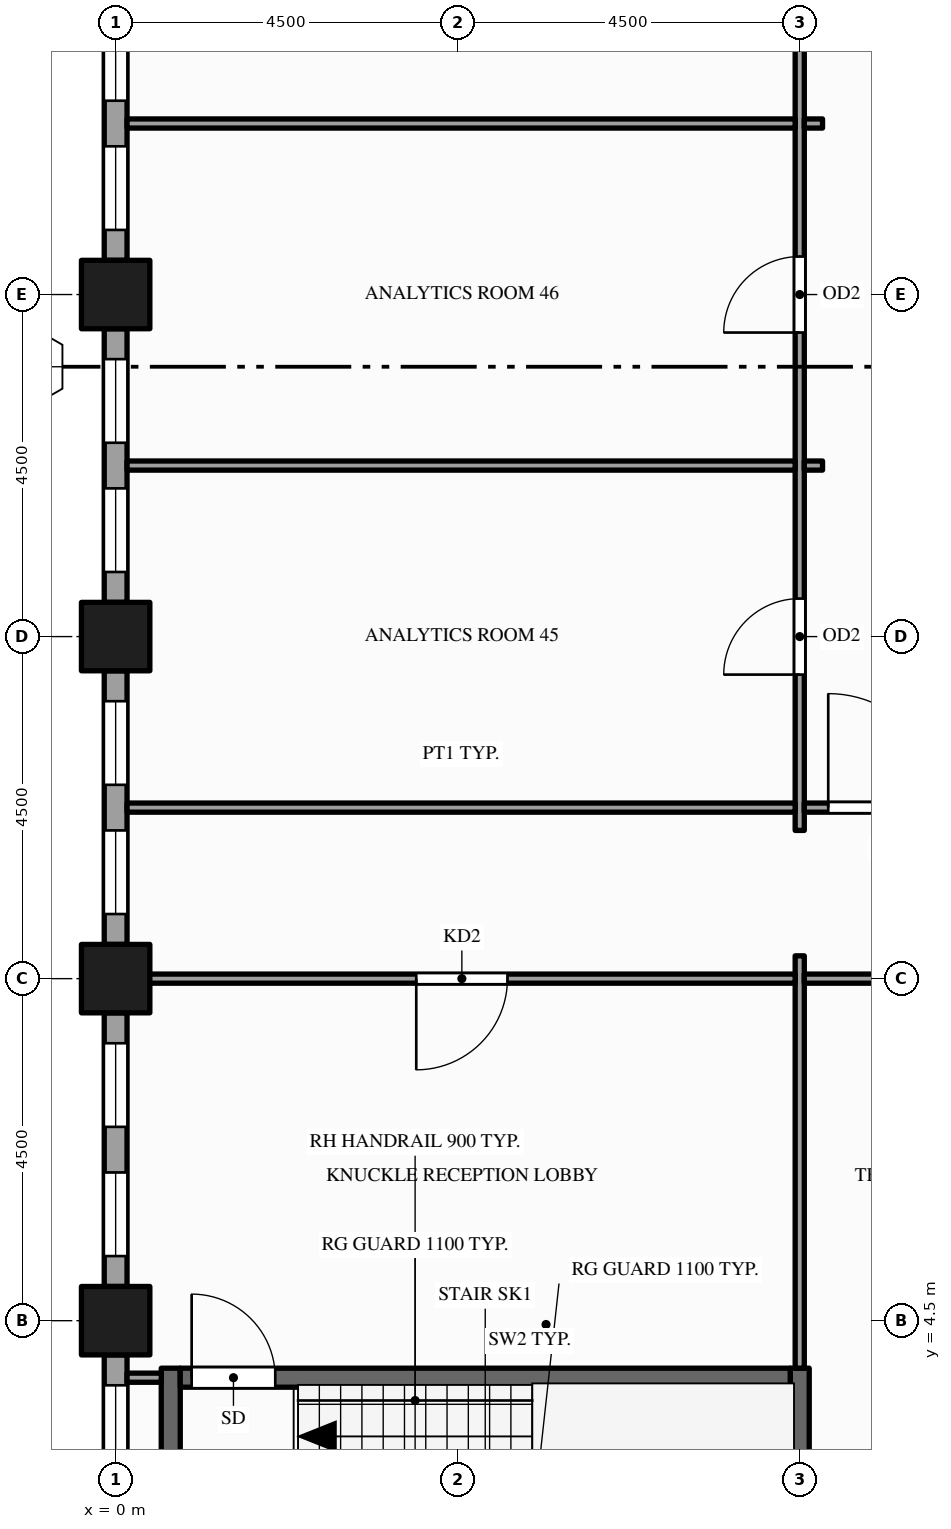
"""IFC4 building model, lengths in metres.
Left out: names, types, materials, properties, quantities, classifications, styles, units other than length and angle.
Written with IfcOpenShell. Run it as: python <this file> out.ifc"""

import sys

from ifc_helpers import new_model, si_unit, direction, frame, frame_2d, origin, origin_2d, place, context, subcontext, project, spatial, rectangle, hollow_rectangle, extrude, element, fill, save


model = new_model("IFC4")
c1 = context("Model", 3, precision=1e-05, world=origin(), true_north=direction((0.0, 1.0)))
c2 = subcontext(c1, "Body", "Model", "MODEL_VIEW")
j1 = project(units=[si_unit("LENGTHUNIT", "METRE"), si_unit("PLANEANGLEUNIT", "RADIAN")], contexts=[c1])
p1 = place(None, origin())
s1 = spatial("IfcSite", under=j1, at=p1, CompositionType="ELEMENT")
p2 = place(p1, origin())
s2 = spatial("IfcBuilding", under=s1, at=p2, CompositionType="ELEMENT")
p3 = place(p2, frame((0.0, 0.0, 159.0)))
s3 = spatial("IfcBuildingStorey", under=s2, at=p3, CompositionType="ELEMENT", Elevation=159.0)
for number, where, z_axis, x_axis in (
    (1, (0.0, 4.5, -0.15), (0.0, 0.0, 1.0), (1.0, 0.0, 0.0)),
    (2, (0.0, 9.0, -0.15), (0.0, 0.0, 1.0), (1.0, 0.0, 0.0)),
    (3, (0.0, 13.5, -0.15), (0.0, 0.0, 1.0), (1.0, 0.0, 0.0)),
    (4, (0.0, 18.0, -0.15), (0.0, 0.0, 1.0), (1.0, 0.0, 0.0)),
):
    element("IfcColumn", number, at=place(p3, frame(where, z_axis=z_axis, x_axis=x_axis)), inside=s3, PredefinedType="COLUMN", context=c2, shape_type="SweptSolid", body=[
        extrude(hollow_rectangle(XDim=0.9, YDim=0.9, WallThickness=0.045, at=origin_2d()), origin(), (0.0, 0.0, 1.0), 4.0),
    ])
p4 = place(p3, frame((0.0, 22.05, 0.0), z_axis=(0.0, 0.0, 1.0), x_axis=(0.0, -1.0, 0.0)))
e5 = element("IfcWall", 5, at=p4, inside=s3, PredefinedType="STANDARD", context=c2, shape_type="SweptSolid", body=[
    extrude(rectangle(XDim=3.6, YDim=0.3, at=frame_2d((1.8, 0.0))), origin(), (0.0, 0.0, 1.0), 3.149),
])
p5 = place(p4, frame((0.4, 0.0, 0.9)))
e6 = element("IfcOpeningElement", 6, at=p5, cuts=e5, PredefinedType="OPENING", context=c2, shape_type="SweptSolid", body=[
    extrude(rectangle(XDim=1.1, YDim=2.0, at=frame_2d((0.55, 1.0))), frame((0.0, 0.16, 0.0), z_axis=(0.0, -1.0, 0.0), x_axis=(1.0, 0.0, 0.0)), (0.0, 0.0, 1.0), 0.32),
])
p6 = place(p4, frame((2.1, 0.0, 0.9)))
e7 = element("IfcOpeningElement", 7, at=p6, cuts=e5, PredefinedType="OPENING", context=c2, shape_type="SweptSolid", body=[
    extrude(rectangle(XDim=1.1, YDim=2.0, at=frame_2d((0.55, 1.0))), frame((0.0, 0.16, 0.0), z_axis=(0.0, -1.0, 0.0), x_axis=(1.0, 0.0, 0.0)), (0.0, 0.0, 1.0), 0.32),
])
p7 = place(p3, frame((0.0, 17.55, 0.0), z_axis=(0.0, 0.0, 1.0), x_axis=(0.0, -1.0, 0.0)))
e8 = element("IfcWall", 8, at=p7, inside=s3, PredefinedType="STANDARD", context=c2, shape_type="SweptSolid", body=[
    extrude(rectangle(XDim=3.6, YDim=0.3, at=frame_2d((1.8, 0.0))), origin(), (0.0, 0.0, 1.0), 3.149),
])
p8 = place(p7, frame((0.4, 0.0, 0.9)))
e9 = element("IfcOpeningElement", 9, at=p8, cuts=e8, PredefinedType="OPENING", context=c2, shape_type="SweptSolid", body=[
    extrude(rectangle(XDim=1.1, YDim=2.0, at=frame_2d((0.55, 1.0))), frame((0.0, 0.16, 0.0), z_axis=(0.0, -1.0, 0.0), x_axis=(1.0, 0.0, 0.0)), (0.0, 0.0, 1.0), 0.32),
])
p9 = place(p7, frame((2.1, 0.0, 0.9)))
e10 = element("IfcOpeningElement", 10, at=p9, cuts=e8, PredefinedType="OPENING", context=c2, shape_type="SweptSolid", body=[
    extrude(rectangle(XDim=1.1, YDim=2.0, at=frame_2d((0.55, 1.0))), frame((0.0, 0.16, 0.0), z_axis=(0.0, -1.0, 0.0), x_axis=(1.0, 0.0, 0.0)), (0.0, 0.0, 1.0), 0.32),
])
p10 = place(p3, frame((0.0, 13.05, 0.0), z_axis=(0.0, 0.0, 1.0), x_axis=(0.0, -1.0, 0.0)))
e11 = element("IfcWall", 11, at=p10, inside=s3, PredefinedType="STANDARD", context=c2, shape_type="SweptSolid", body=[
    extrude(rectangle(XDim=3.6, YDim=0.3, at=frame_2d((1.8, 0.0))), origin(), (0.0, 0.0, 1.0), 3.149),
])
p11 = place(p10, frame((0.4, 0.0, 0.9)))
e12 = element("IfcOpeningElement", 12, at=p11, cuts=e11, PredefinedType="OPENING", context=c2, shape_type="SweptSolid", body=[
    extrude(rectangle(XDim=1.1, YDim=2.0, at=frame_2d((0.55, 1.0))), frame((0.0, 0.16, 0.0), z_axis=(0.0, -1.0, 0.0), x_axis=(1.0, 0.0, 0.0)), (0.0, 0.0, 1.0), 0.32),
])
p12 = place(p10, frame((2.1, 0.0, 0.9)))
e13 = element("IfcOpeningElement", 13, at=p12, cuts=e11, PredefinedType="OPENING", context=c2, shape_type="SweptSolid", body=[
    extrude(rectangle(XDim=1.1, YDim=2.0, at=frame_2d((0.55, 1.0))), frame((0.0, 0.16, 0.0), z_axis=(0.0, -1.0, 0.0), x_axis=(1.0, 0.0, 0.0)), (0.0, 0.0, 1.0), 0.32),
])
p13 = place(p3, frame((0.0, 8.55, 0.0), z_axis=(0.0, 0.0, 1.0), x_axis=(0.0, -1.0, 0.0)))
e14 = element("IfcWall", 14, at=p13, inside=s3, PredefinedType="STANDARD", context=c2, shape_type="SweptSolid", body=[
    extrude(rectangle(XDim=3.6, YDim=0.3, at=frame_2d((1.8, 0.0))), origin(), (0.0, 0.0, 1.0), 3.149),
])
p14 = place(p13, frame((0.4, 0.0, 0.9)))
e15 = element("IfcOpeningElement", 15, at=p14, cuts=e14, PredefinedType="OPENING", context=c2, shape_type="SweptSolid", body=[
    extrude(rectangle(XDim=1.1, YDim=2.0, at=frame_2d((0.55, 1.0))), frame((0.0, 0.16, 0.0), z_axis=(0.0, -1.0, 0.0), x_axis=(1.0, 0.0, 0.0)), (0.0, 0.0, 1.0), 0.32),
])
p15 = place(p13, frame((2.1, 0.0, 0.9)))
e16 = element("IfcOpeningElement", 16, at=p15, cuts=e14, PredefinedType="OPENING", context=c2, shape_type="SweptSolid", body=[
    extrude(rectangle(XDim=1.1, YDim=2.0, at=frame_2d((0.55, 1.0))), frame((0.0, 0.16, 0.0), z_axis=(0.0, -1.0, 0.0), x_axis=(1.0, 0.0, 0.0)), (0.0, 0.0, 1.0), 0.32),
])
p16 = place(p3, frame((0.0, 4.05, 0.0), z_axis=(0.0, 0.0, 1.0), x_axis=(0.0, -1.0, 0.0)))
e17 = element("IfcWall", 17, at=p16, inside=s3, PredefinedType="STANDARD", context=c2, shape_type="SweptSolid", body=[
    extrude(rectangle(XDim=3.6, YDim=0.3, at=frame_2d((1.8, 0.0))), origin(), (0.0, 0.0, 1.0), 3.149),
])
p17 = place(p16, frame((0.4, 0.0, 0.9)))
e18 = element("IfcOpeningElement", 18, at=p17, cuts=e17, PredefinedType="OPENING", context=c2, shape_type="SweptSolid", body=[
    extrude(rectangle(XDim=1.1, YDim=2.0, at=frame_2d((0.55, 1.0))), frame((0.0, 0.16, 0.0), z_axis=(0.0, -1.0, 0.0), x_axis=(1.0, 0.0, 0.0)), (0.0, 0.0, 1.0), 0.32),
])
p18 = place(p16, frame((2.1, 0.0, 0.9)))
e19 = element("IfcOpeningElement", 19, at=p18, cuts=e17, PredefinedType="OPENING", context=c2, shape_type="SweptSolid", body=[
    extrude(rectangle(XDim=1.1, YDim=2.0, at=frame_2d((0.55, 1.0))), frame((0.0, 0.16, 0.0), z_axis=(0.0, -1.0, 0.0), x_axis=(1.0, 0.0, 0.0)), (0.0, 0.0, 1.0), 0.32),
])
p19 = place(p3, frame((0.725, 0.6, 0.0), z_axis=(0.0, 0.0, 1.0), x_axis=(0.0, 1.0, 0.0)))
e20 = element("IfcWall", 20, at=p19, inside=s3, PredefinedType="SHEAR", context=c2, shape_type="SweptSolid", body=[
    extrude(rectangle(XDim=3.275, YDim=0.25, at=frame_2d((1.637, 0.0))), origin(), (0.0, 0.0, 1.0), 3.85),
])
p20 = place(p3, frame((9.0, 0.45, 0.0), z_axis=(0.0, 0.0, 1.0), x_axis=(0.0, 1.0, 0.0)))
e21 = element("IfcWall", 21, at=p20, inside=s3, PredefinedType="SHEAR", context=c2, shape_type="SweptSolid", body=[
    extrude(rectangle(XDim=3.425, YDim=0.25, at=frame_2d((1.712, 0.0))), origin(), (0.0, 0.0, 1.0), 3.85),
])
p21 = place(p3, frame((9.0, 3.875, 0.0), z_axis=(0.0, 0.0, 1.0), x_axis=(0.0, 1.0, 0.0)))
e22 = element("IfcWall", 22, at=p21, inside=s3, PredefinedType="PARTITIONING", context=c2, shape_type="SweptSolid", body=[
    extrude(rectangle(XDim=5.425, YDim=0.12, at=frame_2d((2.712, 0.0))), origin(), (0.0, 0.0, 1.0), 2.87),
])
p22 = place(p3, frame((9.0, 10.95, 0.0), z_axis=(0.0, 0.0, 1.0), x_axis=(0.0, 1.0, 0.0)))
e23 = element("IfcWall", 23, at=p22, inside=s3, PredefinedType="PARTITIONING", context=c2, shape_type="SweptSolid", body=[
    extrude(rectangle(XDim=20.85, YDim=0.12, at=frame_2d((10.425, 0.0))), origin(), (0.0, 0.0, 1.0), 2.6),
])
p23 = place(p22, frame((2.05, 0.0, 0.0)))
e24 = element("IfcOpeningElement", 24, at=p23, cuts=e23, PredefinedType="OPENING", context=c2, shape_type="SweptSolid", body=[
    extrude(rectangle(XDim=1.0, YDim=2.1, at=frame_2d((0.5, 1.05))), frame((0.0, 0.07, 0.0), z_axis=(0.0, -1.0, 0.0), x_axis=(1.0, 0.0, 0.0)), (0.0, 0.0, 1.0), 0.14),
])
p24 = place(p22, frame((6.55, 0.0, 0.0)))
e25 = element("IfcOpeningElement", 25, at=p24, cuts=e23, PredefinedType="OPENING", context=c2, shape_type="SweptSolid", body=[
    extrude(rectangle(XDim=1.0, YDim=2.1, at=frame_2d((0.5, 1.05))), frame((0.0, 0.07, 0.0), z_axis=(0.0, -1.0, 0.0), x_axis=(1.0, 0.0, 0.0)), (0.0, 0.0, 1.0), 0.14),
])
p25 = place(p22, frame((11.805, 0.0, 0.0)))
e26 = element("IfcOpeningElement", 26, at=p25, cuts=e23, PredefinedType="OPENING", context=c2, shape_type="SweptSolid", body=[
    extrude(rectangle(XDim=1.8, YDim=2.1, at=frame_2d((0.9, 1.05))), frame((0.0, 0.07, 0.0), z_axis=(0.0, -1.0, 0.0), x_axis=(1.0, 0.0, 0.0)), (0.0, 0.0, 1.0), 0.14),
])
p26 = place(p3, frame((0.15, 3.75, 0.0), z_axis=(0.0, 0.0, 1.0), x_axis=(1.0, 0.0, 0.0)))
e27 = element("IfcWall", 27, at=p26, inside=s3, PredefinedType="PARTITIONING", context=c2, shape_type="SweptSolid", body=[
    extrude(rectangle(XDim=0.45, YDim=0.12, at=frame_2d((0.225, 0.0))), origin(), (0.0, 0.0, 1.0), 3.85),
])
p27 = place(p3, frame((0.85, 3.75, 0.0), z_axis=(0.0, 0.0, 1.0), x_axis=(1.0, 0.0, 0.0)))
e28 = element("IfcWall", 28, at=p27, inside=s3, PredefinedType="SHEAR", context=c2, shape_type="SweptSolid", body=[
    extrude(rectangle(XDim=8.025, YDim=0.25, at=frame_2d((4.012, 0.0))), origin(), (0.0, 0.0, 1.0), 3.85),
])
p28 = place(p27, frame((0.15, 0.0, 0.0)))
e29 = element("IfcOpeningElement", 29, at=p28, cuts=e28, PredefinedType="OPENING", context=c2, shape_type="SweptSolid", body=[
    extrude(rectangle(XDim=1.1, YDim=2.1, at=frame_2d((0.55, 1.05))), frame((0.0, 0.135, 0.0), z_axis=(0.0, -1.0, 0.0), x_axis=(1.0, 0.0, 0.0)), (0.0, 0.0, 1.0), 0.27),
])
p29 = place(p3, frame((0.15, 9.0, 0.0), z_axis=(0.0, 0.0, 1.0), x_axis=(1.0, 0.0, 0.0)))
e30 = element("IfcWall", 30, at=p29, inside=s3, PredefinedType="PARTITIONING", context=c2, shape_type="SweptSolid", body=[
    extrude(rectangle(XDim=8.79, YDim=0.12, at=frame_2d((4.395, 0.0))), origin(), (0.0, 0.0, 1.0), 2.87),
])
p30 = place(p29, frame((3.805, 0.0, 0.0)))
e31 = element("IfcOpeningElement", 31, at=p30, cuts=e30, PredefinedType="OPENING", context=c2, shape_type="SweptSolid", body=[
    extrude(rectangle(XDim=1.2, YDim=2.1, at=frame_2d((0.6, 1.05))), frame((0.0, 0.07, 0.0), z_axis=(0.0, -1.0, 0.0), x_axis=(1.0, 0.0, 0.0)), (0.0, 0.0, 1.0), 0.14),
])
p31 = place(p3, frame((9.06, 9.0, 0.0), z_axis=(0.0, 0.0, 1.0), x_axis=(1.0, 0.0, 0.0)))
e32 = element("IfcWall", 32, at=p31, inside=s3, PredefinedType="PARTITIONING", context=c2, shape_type="SweptSolid", body=[
    extrude(rectangle(XDim=4.38, YDim=0.12, at=frame_2d((2.19, 0.0))), origin(), (0.0, 0.0, 1.0), 2.87),
])
p32 = place(p31, frame((1.69, 0.0, 0.0)))
e33 = element("IfcOpeningElement", 33, at=p32, cuts=e32, PredefinedType="OPENING", context=c2, shape_type="SweptSolid", body=[
    extrude(rectangle(XDim=1.0, YDim=2.1, at=frame_2d((0.5, 1.05))), frame((0.0, 0.07, 0.0), z_axis=(0.0, -1.0, 0.0), x_axis=(1.0, 0.0, 0.0)), (0.0, 0.0, 1.0), 0.14),
])
p33 = place(p3, frame((0.15, 11.25, 0.0), z_axis=(0.0, 0.0, 1.0), x_axis=(1.0, 0.0, 0.0)))
e34 = element("IfcWall", 34, at=p33, inside=s3, PredefinedType="PARTITIONING", context=c2, shape_type="SweptSolid", body=[
    extrude(rectangle(XDim=8.79, YDim=0.12, at=frame_2d((4.395, 0.0))), origin(), (0.0, 0.0, 1.0), 2.87),
])
p34 = place(p3, frame((9.06, 11.25, 0.0), z_axis=(0.0, 0.0, 1.0), x_axis=(1.0, 0.0, 0.0)))
e35 = element("IfcWall", 35, at=p34, inside=s3, PredefinedType="PARTITIONING", context=c2, shape_type="SweptSolid", body=[
    extrude(rectangle(XDim=2.13, YDim=0.12, at=frame_2d((1.065, 0.0))), origin(), (0.0, 0.0, 1.0), 2.87),
])
p35 = place(p34, frame((0.315, 0.0, 0.0)))
e36 = element("IfcOpeningElement", 36, at=p35, cuts=e35, PredefinedType="OPENING", context=c2, shape_type="SweptSolid", body=[
    extrude(rectangle(XDim=1.5, YDim=2.1, at=frame_2d((0.75, 1.05))), frame((0.0, 0.07, 0.0), z_axis=(0.0, -1.0, 0.0), x_axis=(1.0, 0.0, 0.0)), (0.0, 0.0, 1.0), 0.14),
])
p36 = place(p3, frame((0.15, 15.75, 0.0), z_axis=(0.0, 0.0, 1.0), x_axis=(1.0, 0.0, 0.0)))
e37 = element("IfcWall", 37, at=p36, inside=s3, PredefinedType="PARTITIONING", context=c2, shape_type="SweptSolid", body=[
    extrude(rectangle(XDim=8.79, YDim=0.12, at=frame_2d((4.395, 0.0))), origin(), (0.0, 0.0, 1.0), 2.87),
])
p37 = place(p3, frame((9.06, 15.75, 0.0), z_axis=(0.0, 0.0, 1.0), x_axis=(1.0, 0.0, 0.0)))
e38 = element("IfcWall", 38, at=p37, inside=s3, PredefinedType="PARTITIONING", context=c2, shape_type="SweptSolid", body=[
    extrude(rectangle(XDim=0.24, YDim=0.12, at=frame_2d((0.12, 0.0))), origin(), (0.0, 0.0, 1.0), 2.87),
])
p38 = place(p3, frame((0.15, 20.25, 0.0), z_axis=(0.0, 0.0, 1.0), x_axis=(1.0, 0.0, 0.0)))
e39 = element("IfcWall", 39, at=p38, inside=s3, PredefinedType="PARTITIONING", context=c2, shape_type="SweptSolid", body=[
    extrude(rectangle(XDim=8.79, YDim=0.12, at=frame_2d((4.395, 0.0))), origin(), (0.0, 0.0, 1.0), 2.87),
])
p39 = place(p3, frame((9.06, 20.25, 0.0), z_axis=(0.0, 0.0, 1.0), x_axis=(1.0, 0.0, 0.0)))
e40 = element("IfcWall", 40, at=p39, inside=s3, PredefinedType="PARTITIONING", context=c2, shape_type="SweptSolid", body=[
    extrude(rectangle(XDim=0.24, YDim=0.12, at=frame_2d((0.12, 0.0))), origin(), (0.0, 0.0, 1.0), 2.87),
])
p40 = place(p5, origin())
e41 = element("IfcWindow", 41, at=p40, inside=s3, PartitioningType="SINGLE_PANEL", PredefinedType="WINDOW", context=c2, shape_type="SweptSolid", body=[
    extrude(rectangle(XDim=1.1, YDim=2.0, at=frame_2d((0.55, 1.0))), frame((0.0, 0.03, 0.0), z_axis=(0.0, -1.0, 0.0), x_axis=(1.0, 0.0, 0.0)), (0.0, 0.0, 1.0), 0.06),
])
fill(e6, e41)
p41 = place(p6, origin())
e42 = element("IfcWindow", 42, at=p41, inside=s3, PartitioningType="SINGLE_PANEL", PredefinedType="WINDOW", context=c2, shape_type="SweptSolid", body=[
    extrude(rectangle(XDim=1.1, YDim=2.0, at=frame_2d((0.55, 1.0))), frame((0.0, 0.03, 0.0), z_axis=(0.0, -1.0, 0.0), x_axis=(1.0, 0.0, 0.0)), (0.0, 0.0, 1.0), 0.06),
])
fill(e7, e42)
p42 = place(p8, origin())
e43 = element("IfcWindow", 43, at=p42, inside=s3, PartitioningType="SINGLE_PANEL", PredefinedType="WINDOW", context=c2, shape_type="SweptSolid", body=[
    extrude(rectangle(XDim=1.1, YDim=2.0, at=frame_2d((0.55, 1.0))), frame((0.0, 0.03, 0.0), z_axis=(0.0, -1.0, 0.0), x_axis=(1.0, 0.0, 0.0)), (0.0, 0.0, 1.0), 0.06),
])
fill(e9, e43)
p43 = place(p9, origin())
e44 = element("IfcWindow", 44, at=p43, inside=s3, PartitioningType="SINGLE_PANEL", PredefinedType="WINDOW", context=c2, shape_type="SweptSolid", body=[
    extrude(rectangle(XDim=1.1, YDim=2.0, at=frame_2d((0.55, 1.0))), frame((0.0, 0.03, 0.0), z_axis=(0.0, -1.0, 0.0), x_axis=(1.0, 0.0, 0.0)), (0.0, 0.0, 1.0), 0.06),
])
fill(e10, e44)
p44 = place(p11, origin())
e45 = element("IfcWindow", 45, at=p44, inside=s3, PartitioningType="SINGLE_PANEL", PredefinedType="WINDOW", context=c2, shape_type="SweptSolid", body=[
    extrude(rectangle(XDim=1.1, YDim=2.0, at=frame_2d((0.55, 1.0))), frame((0.0, 0.03, 0.0), z_axis=(0.0, -1.0, 0.0), x_axis=(1.0, 0.0, 0.0)), (0.0, 0.0, 1.0), 0.06),
])
fill(e12, e45)
p45 = place(p12, origin())
e46 = element("IfcWindow", 46, at=p45, inside=s3, PartitioningType="SINGLE_PANEL", PredefinedType="WINDOW", context=c2, shape_type="SweptSolid", body=[
    extrude(rectangle(XDim=1.1, YDim=2.0, at=frame_2d((0.55, 1.0))), frame((0.0, 0.03, 0.0), z_axis=(0.0, -1.0, 0.0), x_axis=(1.0, 0.0, 0.0)), (0.0, 0.0, 1.0), 0.06),
])
fill(e13, e46)
p46 = place(p14, origin())
e47 = element("IfcWindow", 47, at=p46, inside=s3, PartitioningType="SINGLE_PANEL", PredefinedType="WINDOW", context=c2, shape_type="SweptSolid", body=[
    extrude(rectangle(XDim=1.1, YDim=2.0, at=frame_2d((0.55, 1.0))), frame((0.0, 0.03, 0.0), z_axis=(0.0, -1.0, 0.0), x_axis=(1.0, 0.0, 0.0)), (0.0, 0.0, 1.0), 0.06),
])
fill(e15, e47)
p47 = place(p15, origin())
e48 = element("IfcWindow", 48, at=p47, inside=s3, PartitioningType="SINGLE_PANEL", PredefinedType="WINDOW", context=c2, shape_type="SweptSolid", body=[
    extrude(rectangle(XDim=1.1, YDim=2.0, at=frame_2d((0.55, 1.0))), frame((0.0, 0.03, 0.0), z_axis=(0.0, -1.0, 0.0), x_axis=(1.0, 0.0, 0.0)), (0.0, 0.0, 1.0), 0.06),
])
fill(e16, e48)
p48 = place(p17, origin())
e49 = element("IfcWindow", 49, at=p48, inside=s3, PartitioningType="SINGLE_PANEL", PredefinedType="WINDOW", context=c2, shape_type="SweptSolid", body=[
    extrude(rectangle(XDim=1.1, YDim=2.0, at=frame_2d((0.55, 1.0))), frame((0.0, 0.03, 0.0), z_axis=(0.0, -1.0, 0.0), x_axis=(1.0, 0.0, 0.0)), (0.0, 0.0, 1.0), 0.06),
])
fill(e18, e49)
p49 = place(p28, origin())
e50 = element("IfcDoor", 50, at=p49, inside=s3, OperationType="SINGLE_SWING_LEFT", PredefinedType="DOOR", context=c2, shape_type="SweptSolid", body=[
    extrude(rectangle(XDim=1.1, YDim=2.1, at=frame_2d((0.55, 1.05))), frame((0.0, 0.025, 0.0), z_axis=(0.0, -1.0, 0.0), x_axis=(1.0, 0.0, 0.0)), (0.0, 0.0, 1.0), 0.05),
])
fill(e29, e50)
p50 = place(p30, origin())
e51 = element("IfcDoor", 51, at=p50, inside=s3, OperationType="SINGLE_SWING_LEFT", PredefinedType="DOOR", context=c2, shape_type="SweptSolid", body=[
    extrude(rectangle(XDim=1.2, YDim=2.1, at=frame_2d((0.6, 1.05))), frame((0.0, 0.025, 0.0), z_axis=(0.0, -1.0, 0.0), x_axis=(1.0, 0.0, 0.0)), (0.0, 0.0, 1.0), 0.05),
])
fill(e31, e51)
p51 = place(p35, origin())
e52 = element("IfcDoor", 52, at=p51, inside=s3, OperationType="SINGLE_SWING_LEFT", PredefinedType="DOOR", context=c2, shape_type="SweptSolid", body=[
    extrude(rectangle(XDim=1.5, YDim=2.1, at=frame_2d((0.75, 1.05))), frame((0.0, 0.025, 0.0), z_axis=(0.0, -1.0, 0.0), x_axis=(1.0, 0.0, 0.0)), (0.0, 0.0, 1.0), 0.05),
])
fill(e36, e52)
p52 = place(p23, origin())
e53 = element("IfcDoor", 53, at=p52, inside=s3, OperationType="SINGLE_SWING_LEFT", PredefinedType="DOOR", context=c2, shape_type="SweptSolid", body=[
    extrude(rectangle(XDim=1.0, YDim=2.1, at=frame_2d((0.5, 1.05))), frame((0.0, 0.025, 0.0), z_axis=(0.0, -1.0, 0.0), x_axis=(1.0, 0.0, 0.0)), (0.0, 0.0, 1.0), 0.05),
])
fill(e24, e53)
p53 = place(p24, origin())
e54 = element("IfcDoor", 54, at=p53, inside=s3, OperationType="SINGLE_SWING_LEFT", PredefinedType="DOOR", context=c2, shape_type="SweptSolid", body=[
    extrude(rectangle(XDim=1.0, YDim=2.1, at=frame_2d((0.5, 1.05))), frame((0.0, 0.025, 0.0), z_axis=(0.0, -1.0, 0.0), x_axis=(1.0, 0.0, 0.0)), (0.0, 0.0, 1.0), 0.05),
])
fill(e25, e54)
save(model, sys.argv[1])
